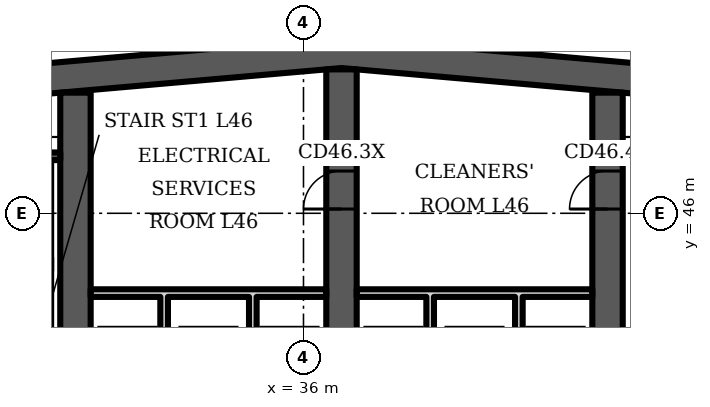
"""IFC4 building model, lengths in metres.
Left out: names, types, materials, properties, quantities, classifications, styles, units other than length and angle.
Written with IfcOpenShell. Run it as: python <this file> out.ifc"""

import sys

from ifc_helpers import new_model, si_unit, direction, frame, frame_2d, origin, place, context, subcontext, project, spatial, polyline, rectangle, outline, extrude, element, fill, save


model = new_model("IFC4")
c1 = context("Model", 3, precision=1e-05, world=origin(), true_north=direction((0.0, 1.0)))
c2 = subcontext(c1, "Body", "Model", "MODEL_VIEW")
j1 = project(units=[si_unit("LENGTHUNIT", "METRE"), si_unit("PLANEANGLEUNIT", "RADIAN")], contexts=[c1])
p1 = place(None, origin())
s1 = spatial("IfcSite", under=j1, at=p1, CompositionType="ELEMENT")
p2 = place(p1, origin())
s2 = spatial("IfcBuilding", under=s1, at=p2, CompositionType="ELEMENT")
p3 = place(p2, frame((0.0, 0.0, 187.9)))
s3 = spatial("IfcBuildingStorey", under=s2, at=p3, CompositionType="ELEMENT", Elevation=187.9)
p4 = place(p3, origin())
e1 = element("IfcWall", 1, at=p4, inside=s3, PredefinedType="SHEAR", context=c2, shape_type="SweptSolid", body=[
    extrude(outline(polyline([(16.0, 47.984), (37.0, 49.822), (58.0, 47.984), (58.0, 48.787), (37.0, 50.625), (16.0, 48.787), (16.0, 47.984)])), origin(), (0.0, 0.0, 1.0), 3.6),
])
p5 = place(p3, frame((30.0, 34.8, 0.0), z_axis=(0.0, 0.0, 1.0), x_axis=(0.0, 1.0, 0.0)))
e2 = element("IfcWall", 2, at=p5, inside=s3, PredefinedType="SHEAR", context=c2, shape_type="SweptSolid", body=[
    extrude(rectangle(XDim=14.374, YDim=0.8, at=frame_2d((7.187, 0.0))), origin(), (0.0, 0.0, 1.0), 3.6),
])
p6 = place(p5, frame((3.6, 0.0, 0.0)))
e3 = element("IfcOpeningElement", 3, at=p6, cuts=e2, PredefinedType="OPENING", context=c2, shape_type="SweptSolid", body=[
    extrude(rectangle(XDim=1.1, YDim=2.1, at=frame_2d((0.55, 1.05))), frame((0.0, 0.41, 0.0), z_axis=(0.0, -1.0, 0.0), x_axis=(1.0, 0.0, 0.0)), (0.0, 0.0, 1.0), 0.82),
])
p7 = place(p3, frame((37.0, 34.8, 0.0), z_axis=(0.0, 0.0, 1.0), x_axis=(0.0, 1.0, 0.0)))
e4 = element("IfcWall", 4, at=p7, inside=s3, PredefinedType="SHEAR", context=c2, shape_type="SweptSolid", body=[
    extrude(rectangle(XDim=14.987, YDim=0.8, at=frame_2d((7.493, 0.0))), origin(), (0.0, 0.0, 1.0), 3.6),
])
p8 = place(p7, frame((11.312, 0.0, 0.0)))
e5 = element("IfcOpeningElement", 5, at=p8, cuts=e4, PredefinedType="OPENING", context=c2, shape_type="SweptSolid", body=[
    extrude(rectangle(XDim=1.0, YDim=2.1, at=frame_2d((0.5, 1.05))), frame((0.0, 0.41, 0.0), z_axis=(0.0, -1.0, 0.0), x_axis=(1.0, 0.0, 0.0)), (0.0, 0.0, 1.0), 0.82),
])
p9 = place(p7, frame((3.6, 0.0, 0.0)))
e6 = element("IfcOpeningElement", 6, at=p9, cuts=e4, PredefinedType="OPENING", context=c2, shape_type="SweptSolid", body=[
    extrude(rectangle(XDim=1.1, YDim=2.1, at=frame_2d((0.55, 1.05))), frame((0.0, 0.41, 0.0), z_axis=(0.0, -1.0, 0.0), x_axis=(1.0, 0.0, 0.0)), (0.0, 0.0, 1.0), 0.82),
])
p10 = place(p3, frame((44.0, 34.8, 0.0), z_axis=(0.0, 0.0, 1.0), x_axis=(0.0, 1.0, 0.0)))
e7 = element("IfcWall", 7, at=p10, inside=s3, PredefinedType="SHEAR", context=c2, shape_type="SweptSolid", body=[
    extrude(rectangle(XDim=14.374, YDim=0.8, at=frame_2d((7.187, 0.0))), origin(), (0.0, 0.0, 1.0), 3.6),
])
p11 = place(p10, frame((11.312, 0.0, 0.0)))
e8 = element("IfcOpeningElement", 8, at=p11, cuts=e7, PredefinedType="OPENING", context=c2, shape_type="SweptSolid", body=[
    extrude(rectangle(XDim=1.0, YDim=2.1, at=frame_2d((0.5, 1.05))), frame((0.0, 0.41, 0.0), z_axis=(0.0, -1.0, 0.0), x_axis=(1.0, 0.0, 0.0)), (0.0, 0.0, 1.0), 0.82),
])
p12 = place(p10, frame((3.6, 0.0, 0.0)))
e9 = element("IfcOpeningElement", 9, at=p12, cuts=e7, PredefinedType="OPENING", context=c2, shape_type="SweptSolid", body=[
    extrude(rectangle(XDim=1.1, YDim=2.1, at=frame_2d((0.55, 1.05))), frame((0.0, 0.41, 0.0), z_axis=(0.0, -1.0, 0.0), x_axis=(1.0, 0.0, 0.0)), (0.0, 0.0, 1.0), 0.82),
])
p13 = place(p3, frame((25.75, 47.5, 0.0), z_axis=(0.0, 0.0, 1.0), x_axis=(1.0, 0.0, 0.0)))
e10 = element("IfcWall", 10, at=p13, inside=s3, PredefinedType="SHEAR", context=c2, shape_type="SweptSolid", body=[
    extrude(rectangle(XDim=3.85, YDim=0.2, at=frame_2d((1.925, 0.0))), origin(), (0.0, 0.0, 1.0), 3.2),
])
p14 = place(p3, origin())
e11 = element("IfcWall", 11, at=p14, inside=s3, PredefinedType="PARTITIONING", context=c2, shape_type="SweptSolid", body=[
    extrude(outline(polyline([(32.433, 40.8), (32.233, 40.8), (32.233, 43.8), (30.4, 43.8), (30.4, 44.0), (36.6, 44.0), (36.6, 43.8), (34.767, 43.8), (34.767, 40.8), (34.567, 40.8), (34.567, 43.8), (32.433, 43.8), (32.433, 40.8)])), origin(), (0.0, 0.0, 1.0), 3.2),
])
p15 = place(p3, origin())
e12 = element("IfcWall", 12, at=p15, inside=s3, PredefinedType="PARTITIONING", context=c2, shape_type="SweptSolid", body=[
    extrude(outline(polyline([(39.433, 40.8), (39.233, 40.8), (39.233, 43.8), (37.4, 43.8), (37.4, 44.0), (43.6, 44.0), (43.6, 43.8), (41.767, 43.8), (41.767, 40.8), (41.567, 40.8), (41.567, 43.8), (39.433, 43.8), (39.433, 40.8)])), origin(), (0.0, 0.0, 1.0), 3.2),
])
p16 = place(p8, origin())
e13 = element("IfcDoor", 13, at=p16, inside=s3, OperationType="SINGLE_SWING_LEFT", PredefinedType="DOOR", context=c2, shape_type="SweptSolid", body=[
    extrude(rectangle(XDim=1.0, YDim=2.1, at=frame_2d((0.5, 1.05))), frame((0.0, 0.4, 0.0), z_axis=(0.0, -1.0, 0.0), x_axis=(1.0, 0.0, 0.0)), (0.0, 0.0, 1.0), 0.8),
])
fill(e5, e13)
p17 = place(p11, origin())
e14 = element("IfcDoor", 14, at=p17, inside=s3, OperationType="SINGLE_SWING_LEFT", PredefinedType="DOOR", context=c2, shape_type="SweptSolid", body=[
    extrude(rectangle(XDim=1.0, YDim=2.1, at=frame_2d((0.5, 1.05))), frame((0.0, 0.4, 0.0), z_axis=(0.0, -1.0, 0.0), x_axis=(1.0, 0.0, 0.0)), (0.0, 0.0, 1.0), 0.8),
])
fill(e8, e14)
save(model, sys.argv[1])
